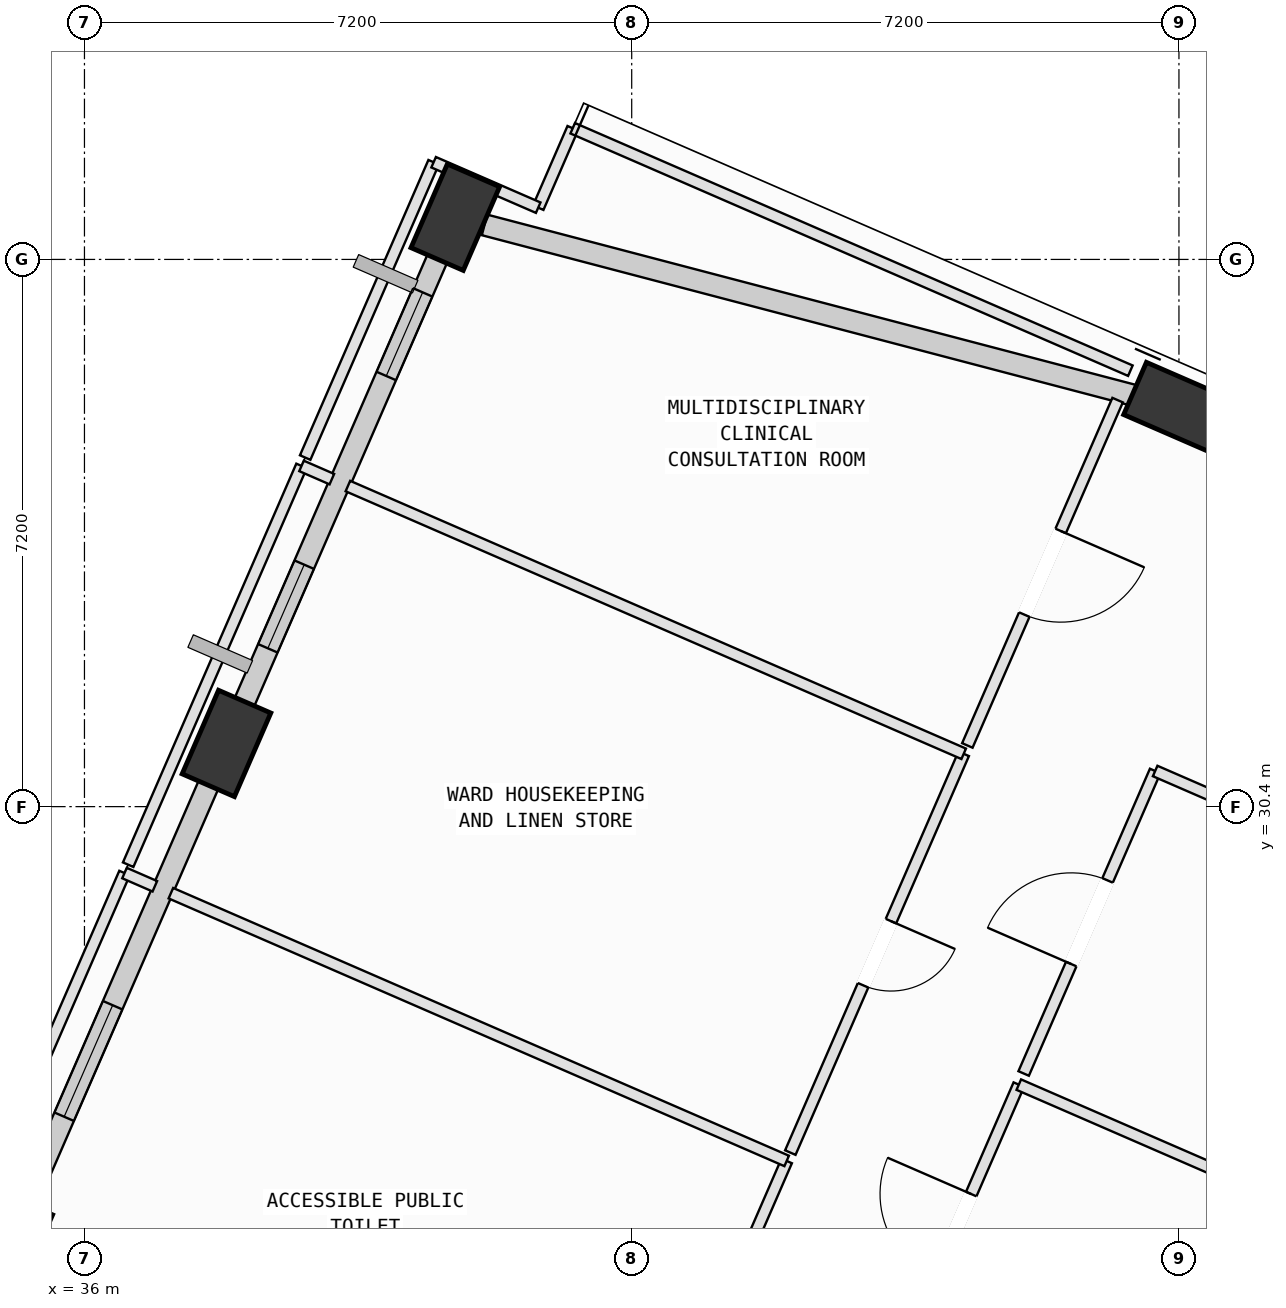
"""IFC4 building model, lengths in metres.
Left out: names, types, materials, properties, quantities, classifications, styles, units other than length and angle.
Written with IfcOpenShell. Run it as: python <this file> out.ifc"""

import sys

from ifc_helpers import new_model, si_unit, direction, frame, frame_2d, origin, origin_2d, place, context, subcontext, project, spatial, rectangle, extrude, element, fill, save


model = new_model("IFC4")
c1 = context("Model", 3, precision=1e-05, world=origin(), true_north=direction((0.0, 1.0)))
c2 = subcontext(c1, "Body", "Model", "MODEL_VIEW")
j1 = project(units=[si_unit("LENGTHUNIT", "METRE"), si_unit("PLANEANGLEUNIT", "RADIAN")], contexts=[c1])
p1 = place(None, origin())
s1 = spatial("IfcSite", under=j1, at=p1, CompositionType="ELEMENT")
p2 = place(p1, origin())
s2 = spatial("IfcBuilding", under=s1, at=p2, CompositionType="ELEMENT")
p3 = place(p2, frame((0.0, 0.0, 320.6)))
s3 = spatial("IfcBuildingStorey", under=s2, at=p3, CompositionType="ELEMENT", Elevation=320.6)
for number, where, z_axis, x_axis in (
    (1, (50.373, 35.663, 0.002), (0.0, 0.0, 1.0), (-0.917, 0.399, 0.0)),
    (2, (40.879, 38.155, 0.002), (0.0, 0.0, 1.0), (0.399, 0.917, 0.0)),
    (3, (37.868, 31.231, 0.002), (0.0, 0.0, 1.0), (0.399, 0.917, 0.0)),
    (4, (34.998, 24.628, 0.002), (0.0, 0.0, 1.0), (0.399, 0.917, 0.0)),
):
    element("IfcColumn", number, at=place(p3, frame(where, z_axis=z_axis, x_axis=x_axis)), inside=s3, PredefinedType="COLUMN", context=c2, shape_type="SweptSolid", body=[
        extrude(rectangle(XDim=1.2, YDim=0.75, at=origin_2d()), origin(), (0.0, 0.0, 1.0), 3.996),
    ])
p4 = place(p3, frame((50.737, 35.504, 0.0), z_axis=(0.0, 0.0, 1.0), x_axis=(0.917057311373, -0.398755423359, 0.0)))
e5 = element("IfcWall", 5, at=p4, inside=s3, PredefinedType="SOLIDWALL", context=c2, shape_type="SweptSolid", body=[
    extrude(rectangle(XDim=7.005, YDim=0.28, at=frame_2d((3.502, 0.0))), origin(), (0.0, 0.0, 1.0), 3.265),
])
p5 = place(p3, frame((41.264, 38.054, 0.0), z_axis=(0.0, 0.0, 1.0), x_axis=(0.967228971308, -0.253905724755, 0.0)))
e6 = element("IfcWall", 6, at=p5, inside=s3, PredefinedType="SOLIDWALL", context=c2, shape_type="SweptSolid", body=[
    extrude(rectangle(XDim=9.02, YDim=0.28, at=frame_2d((4.51, 0.0))), origin(), (0.0, 0.0, 1.0), 3.265),
])
p6 = place(p3, frame((38.027, 31.596, 0.0), z_axis=(0.0, 0.0, 1.0), x_axis=(0.398764437463, 0.917053391802, 0.0)))
e7 = element("IfcWall", 7, at=p6, inside=s3, PredefinedType="SOLIDWALL", context=c2, shape_type="SweptSolid", body=[
    extrude(rectangle(XDim=6.755, YDim=0.28, at=frame_2d((3.377, 0.0))), origin(), (0.0, 0.0, 1.0), 3.265),
])
p7 = place(p6, frame((0.968, 0.0, 0.75)))
e8 = element("IfcOpeningElement", 8, at=p7, cuts=e7, PredefinedType="OPENING", context=c2, shape_type="SweptSolid", body=[
    extrude(rectangle(XDim=1.2, YDim=1.75, at=frame_2d((0.6, 0.875))), frame((0.0, 0.15, 0.0), z_axis=(0.0, -1.0, 0.0), x_axis=(1.0, 0.0, 0.0)), (0.0, 0.0, 1.0), 0.3),
])
p8 = place(p6, frame((4.875, 0.0, 0.75)))
e9 = element("IfcOpeningElement", 9, at=p8, cuts=e7, PredefinedType="OPENING", context=c2, shape_type="SweptSolid", body=[
    extrude(rectangle(XDim=1.2, YDim=1.75, at=frame_2d((0.6, 0.875))), frame((0.0, 0.15, 0.0), z_axis=(0.0, -1.0, 0.0), x_axis=(1.0, 0.0, 0.0)), (0.0, 0.0, 1.0), 0.3),
])
p9 = place(p3, frame((35.156, 24.993, 0.0), z_axis=(0.0, 0.0, 1.0), x_axis=(0.398758169539, 0.917056117272, 0.0)))
e10 = element("IfcWall", 10, at=p9, inside=s3, PredefinedType="SOLIDWALL", context=c2, shape_type="SweptSolid", body=[
    extrude(rectangle(XDim=6.405, YDim=0.28, at=frame_2d((3.202, 0.0))), origin(), (0.0, 0.0, 1.0), 3.265),
])
p10 = place(p9, frame((1.447, 0.0, 0.75)))
e11 = element("IfcOpeningElement", 11, at=p10, cuts=e10, PredefinedType="OPENING", context=c2, shape_type="SweptSolid", body=[
    extrude(rectangle(XDim=1.6, YDim=1.95, at=frame_2d((0.8, 0.975))), frame((0.0, 0.15, 0.0), z_axis=(0.0, -1.0, 0.0), x_axis=(1.0, 0.0, 0.0)), (0.0, 0.0, 1.0), 0.3),
])
p11 = place(p3, frame((46.563, 22.762, 0.0), z_axis=(0.0, 0.0, 1.0), x_axis=(0.398639711207, 0.917107616722, 0.0)))
e12 = element("IfcWall", 12, at=p11, inside=s3, PredefinedType="PARTITIONING", context=c2, shape_type="SweptSolid", body=[
    extrude(rectangle(XDim=4.34, YDim=0.15, at=frame_2d((2.17, 0.0))), origin(), (0.0, 0.0, 1.0), 3.415),
])
p12 = place(p11, frame((1.57, 0.0, 0.0)))
e13 = element("IfcOpeningElement", 13, at=p12, cuts=e12, PredefinedType="OPENING", context=c2, shape_type="SweptSolid", body=[
    extrude(rectangle(XDim=1.2, YDim=2.15, at=frame_2d((0.6, 1.075))), frame((0.0, 0.085, 0.0), z_axis=(0.0, -1.0, 0.0), x_axis=(1.0, 0.0, 0.0)), (0.0, 0.0, 1.0), 0.17),
])
p13 = place(p3, frame((48.293, 26.742, 0.0), z_axis=(0.0, 0.0, 1.0), x_axis=(0.917063062267, -0.398742197197, 0.0)))
e14 = element("IfcWall", 14, at=p13, inside=s3, PredefinedType="PARTITIONING", context=c2, shape_type="SweptSolid", body=[
    extrude(rectangle(XDim=9.435, YDim=0.15, at=frame_2d((4.717, 0.0))), origin(), (0.0, 0.0, 1.0), 3.78),
])
p14 = place(p3, frame((48.357, 26.889, 0.0), z_axis=(0.0, 0.0, 1.0), x_axis=(0.398639711207, 0.917107616722, 0.0)))
e15 = element("IfcWall", 15, at=p14, inside=s3, PredefinedType="PARTITIONING", context=c2, shape_type="SweptSolid", body=[
    extrude(rectangle(XDim=4.34, YDim=0.15, at=frame_2d((2.17, 0.0))), origin(), (0.0, 0.0, 1.0), 3.78),
])
p15 = place(p14, frame((1.57, 0.0, 0.0)))
e16 = element("IfcOpeningElement", 16, at=p15, cuts=e15, PredefinedType="OPENING", context=c2, shape_type="SweptSolid", body=[
    extrude(rectangle(XDim=1.2, YDim=2.15, at=frame_2d((0.6, 1.075))), frame((0.0, 0.085, 0.0), z_axis=(0.0, -1.0, 0.0), x_axis=(1.0, 0.0, 0.0)), (0.0, 0.0, 1.0), 0.17),
])
p16 = place(p3, frame((50.087, 30.869, 0.0), z_axis=(0.0, 0.0, 1.0), x_axis=(0.917068340421, -0.398730057805, 0.0)))
e17 = element("IfcWall", 17, at=p16, inside=s3, PredefinedType="PARTITIONING", context=c2, shape_type="SweptSolid", body=[
    extrude(rectangle(XDim=9.049, YDim=0.15, at=frame_2d((4.524, 0.0))), origin(), (0.0, 0.0, 1.0), 3.78),
])
p17 = place(p3, frame((45.239, 25.738, 0.0), z_axis=(0.0, 0.0, 1.0), x_axis=(-0.398677741034, -0.917091085337, 0.0)))
e18 = element("IfcWall", 18, at=p17, inside=s3, PredefinedType="PARTITIONING", context=c2, shape_type="SweptSolid", body=[
    extrude(rectangle(XDim=5.721, YDim=0.15, at=frame_2d((2.861, 0.0))), origin(), (0.0, 0.0, 1.0), 3.78),
])
p18 = place(p17, frame((2.401, 0.0, 0.0)))
e19 = element("IfcOpeningElement", 19, at=p18, cuts=e18, PredefinedType="OPENING", context=c2, shape_type="SweptSolid", body=[
    extrude(rectangle(XDim=0.92, YDim=2.1, at=frame_2d((0.46, 1.05))), frame((0.0, 0.085, 0.0), z_axis=(0.0, -1.0, 0.0), x_axis=(1.0, 0.0, 0.0)), (0.0, 0.0, 1.0), 0.17),
])
p19 = place(p3, frame((34.246, 24.279, 0.0), z_axis=(0.0, 0.0, 1.0), x_axis=(0.398693343221, 0.917084302598, 0.0)))
e20 = element("IfcWall", 20, at=p19, inside=s3, PredefinedType="PARTITIONING", context=c2, shape_type="SweptSolid", body=[
    extrude(rectangle(XDim=5.721, YDim=0.15, at=frame_2d((2.861, 0.0))), origin(), (0.0, 0.0, 1.0), 3.78),
])
p20 = place(p3, frame((36.527, 29.526, 0.0), z_axis=(0.0, 0.0, 1.0), x_axis=(0.916748651636, -0.399464528742, 0.0)))
e21 = element("IfcWall", 21, at=p20, inside=s3, PredefinedType="PARTITIONING", context=c2, shape_type="SweptSolid", body=[
    extrude(rectangle(XDim=0.435, YDim=0.15, at=frame_2d((0.218, 0.0))), origin(), (0.0, 0.0, 1.0), 3.78),
])
p21 = place(p3, frame((37.137, 29.261, 0.0), z_axis=(0.0, 0.0, 1.0), x_axis=(0.917056875857, -0.398756424957, 0.0)))
e22 = element("IfcWall", 22, at=p21, inside=s3, PredefinedType="PARTITIONING", context=c2, shape_type="SweptSolid", body=[
    extrude(rectangle(XDim=8.835, YDim=0.15, at=frame_2d((4.417, 0.0))), origin(), (0.0, 0.0, 1.0), 3.78),
])
p22 = place(p3, frame((47.568, 31.095, 0.0), z_axis=(0.0, 0.0, 1.0), x_axis=(-0.398677741034, -0.917091085337, 0.0)))
e23 = element("IfcWall", 23, at=p22, inside=s3, PredefinedType="PARTITIONING", context=c2, shape_type="SweptSolid", body=[
    extrude(rectangle(XDim=5.721, YDim=0.15, at=frame_2d((2.861, 0.0))), origin(), (0.0, 0.0, 1.0), 3.78),
])
p23 = place(p22, frame((2.401, 0.0, 0.0)))
e24 = element("IfcOpeningElement", 24, at=p23, cuts=e23, PredefinedType="OPENING", context=c2, shape_type="SweptSolid", body=[
    extrude(rectangle(XDim=0.92, YDim=2.1, at=frame_2d((0.46, 1.05))), frame((0.0, 0.085, 0.0), z_axis=(0.0, -1.0, 0.0), x_axis=(1.0, 0.0, 0.0)), (0.0, 0.0, 1.0), 0.17),
])
p24 = place(p3, frame((36.575, 29.636, 0.0), z_axis=(0.0, 0.0, 1.0), x_axis=(0.398677741034, 0.917091085337, 0.0)))
e25 = element("IfcWall", 25, at=p24, inside=s3, PredefinedType="PARTITIONING", context=c2, shape_type="SweptSolid", body=[
    extrude(rectangle(XDim=5.721, YDim=0.15, at=frame_2d((2.861, 0.0))), origin(), (0.0, 0.0, 1.0), 3.78),
])
p25 = place(p3, frame((38.856, 34.883, 0.0), z_axis=(0.0, 0.0, 1.0), x_axis=(0.916543116757, -0.399935888769, 0.0)))
e26 = element("IfcWall", 26, at=p25, inside=s3, PredefinedType="PARTITIONING", context=c2, shape_type="SweptSolid", body=[
    extrude(rectangle(XDim=0.435, YDim=0.15, at=frame_2d((0.218, 0.0))), origin(), (0.0, 0.0, 1.0), 3.78),
])
p26 = place(p3, frame((39.466, 34.618, 0.0), z_axis=(0.0, 0.0, 1.0), x_axis=(0.917056875857, -0.398756424957, 0.0)))
e27 = element("IfcWall", 27, at=p26, inside=s3, PredefinedType="PARTITIONING", context=c2, shape_type="SweptSolid", body=[
    extrude(rectangle(XDim=8.835, YDim=0.15, at=frame_2d((4.417, 0.0))), origin(), (0.0, 0.0, 1.0), 3.78),
])
p27 = place(p3, frame((41.97, 38.281, 0.0), z_axis=(0.0, 0.0, 1.0), x_axis=(0.398569395059, 0.917138177878, 0.0)))
e28 = element("IfcWall", 28, at=p27, inside=s3, PredefinedType="PARTITIONING", context=c2, shape_type="SweptSolid", body=[
    extrude(rectangle(XDim=1.139, YDim=0.15, at=frame_2d((0.57, 0.0))), origin(), (0.0, 0.0, 1.0), 3.78),
])
p28 = place(p3, frame((42.424, 39.326, 0.0), z_axis=(0.0, 0.0, 1.0), x_axis=(0.917071026557, -0.398723879708, 0.0)))
e29 = element("IfcWall", 29, at=p28, inside=s3, PredefinedType="PARTITIONING", context=c2, shape_type="SweptSolid", body=[
    extrude(rectangle(XDim=8.0, YDim=0.15, at=frame_2d((4.0, 0.0))), origin(), (0.0, 0.0, 1.0), 3.265),
])
p29 = place(p3, frame((49.593, 35.749, 0.0), z_axis=(0.0, 0.0, 1.0), x_axis=(-0.398967500085, -0.916965066879, 0.0)))
e30 = element("IfcWall", 30, at=p29, inside=s3, PredefinedType="PARTITIONING", context=c2, shape_type="SweptSolid", body=[
    extrude(rectangle(XDim=4.955, YDim=0.15, at=frame_2d((2.478, 0.0))), origin(), (0.0, 0.0, 1.0), 2.765),
])
p30 = place(p29, frame((1.878, 0.0, 0.0)))
e31 = element("IfcOpeningElement", 31, at=p30, cuts=e30, PredefinedType="OPENING", context=c2, shape_type="SweptSolid", body=[
    extrude(rectangle(XDim=1.2, YDim=2.15, at=frame_2d((0.6, 1.075))), frame((0.0, 0.085, 0.0), z_axis=(0.0, -1.0, 0.0), x_axis=(1.0, 0.0, 0.0)), (0.0, 0.0, 1.0), 0.17),
])
p31 = place(p3, frame((38.904, 34.993, 0.0), z_axis=(0.0, 0.0, 1.0), x_axis=(0.398801951282, 0.917037078669, 0.0)))
e32 = element("IfcWall", 32, at=p31, inside=s3, PredefinedType="PARTITIONING", context=c2, shape_type="SweptSolid", body=[
    extrude(rectangle(XDim=4.238, YDim=0.15, at=frame_2d((2.119, 0.0))), origin(), (0.0, 0.0, 1.0), 3.78),
])
p32 = place(p3, frame((40.594, 38.879, 0.0), z_axis=(0.0, 0.0, 1.0), x_axis=(0.91715541112, -0.398529737728, 0.0)))
e33 = element("IfcWall", 33, at=p32, inside=s3, PredefinedType="PARTITIONING", context=c2, shape_type="SweptSolid", body=[
    extrude(rectangle(XDim=1.5, YDim=0.15, at=frame_2d((0.75, 0.0))), origin(), (0.0, 0.0, 1.0), 3.265),
])
p33 = place(p7, origin())
e34 = element("IfcWindow", 34, at=p33, inside=s3, PartitioningType="SINGLE_PANEL", PredefinedType="WINDOW", context=c2, shape_type="SweptSolid", body=[
    extrude(rectangle(XDim=1.2, YDim=1.75, at=frame_2d((0.6, 0.875))), frame((0.0, 0.03, 0.0), z_axis=(0.0, -1.0, 0.0), x_axis=(1.0, 0.0, 0.0)), (0.0, 0.0, 1.0), 0.06),
])
fill(e8, e34)
p34 = place(p8, origin())
e35 = element("IfcWindow", 35, at=p34, inside=s3, PartitioningType="SINGLE_PANEL", PredefinedType="WINDOW", context=c2, shape_type="SweptSolid", body=[
    extrude(rectangle(XDim=1.2, YDim=1.75, at=frame_2d((0.6, 0.875))), frame((0.0, 0.03, 0.0), z_axis=(0.0, -1.0, 0.0), x_axis=(1.0, 0.0, 0.0)), (0.0, 0.0, 1.0), 0.06),
])
fill(e9, e35)
p35 = place(p10, origin())
e36 = element("IfcWindow", 36, at=p35, inside=s3, PartitioningType="SINGLE_PANEL", PredefinedType="WINDOW", context=c2, shape_type="SweptSolid", body=[
    extrude(rectangle(XDim=1.6, YDim=1.95, at=frame_2d((0.8, 0.975))), frame((0.0, 0.03, 0.0), z_axis=(0.0, -1.0, 0.0), x_axis=(1.0, 0.0, 0.0)), (0.0, 0.0, 1.0), 0.06),
])
fill(e11, e36)
p36 = place(p12, origin())
e37 = element("IfcDoor", 37, at=p36, inside=s3, OperationType="SINGLE_SWING_RIGHT", PredefinedType="DOOR", context=c2, shape_type="SweptSolid", body=[
    extrude(rectangle(XDim=1.2, YDim=2.15, at=frame_2d((0.6, 1.075))), frame((0.0, 0.025, 0.0), z_axis=(0.0, -1.0, 0.0), x_axis=(1.0, 0.0, 0.0)), (0.0, 0.0, 1.0), 0.05),
])
fill(e13, e37)
p37 = place(p15, origin())
e38 = element("IfcDoor", 38, at=p37, inside=s3, OperationType="SINGLE_SWING_LEFT", PredefinedType="DOOR", context=c2, shape_type="SweptSolid", body=[
    extrude(rectangle(XDim=1.2, YDim=2.15, at=frame_2d((0.6, 1.075))), frame((0.0, 0.025, 0.0), z_axis=(0.0, -1.0, 0.0), x_axis=(1.0, 0.0, 0.0)), (0.0, 0.0, 1.0), 0.05),
])
fill(e16, e38)
p38 = place(p23, origin())
e39 = element("IfcDoor", 39, at=p38, inside=s3, OperationType="SINGLE_SWING_LEFT", PredefinedType="DOOR", context=c2, shape_type="SweptSolid", body=[
    extrude(rectangle(XDim=0.92, YDim=2.1, at=frame_2d((0.46, 1.05))), frame((0.0, 0.025, 0.0), z_axis=(0.0, -1.0, 0.0), x_axis=(1.0, 0.0, 0.0)), (0.0, 0.0, 1.0), 0.05),
])
fill(e24, e39)
p39 = place(p30, origin())
e40 = element("IfcDoor", 40, at=p39, inside=s3, OperationType="SINGLE_SWING_LEFT", PredefinedType="DOOR", context=c2, shape_type="SweptSolid", body=[
    extrude(rectangle(XDim=1.2, YDim=2.15, at=frame_2d((0.6, 1.075))), frame((0.0, 0.025, 0.0), z_axis=(0.0, -1.0, 0.0), x_axis=(1.0, 0.0, 0.0)), (0.0, 0.0, 1.0), 0.05),
])
fill(e31, e40)
save(model, sys.argv[1])
